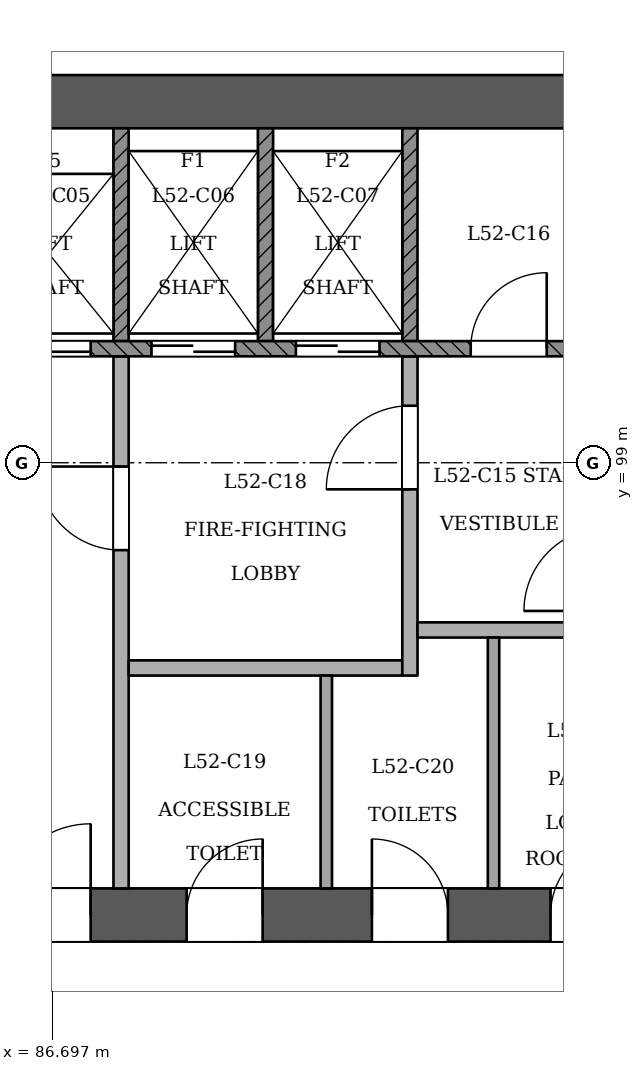
"""IFC4 building model, lengths in metres.
Left out: names, types, materials, properties, quantities, classifications, styles, units other than length and angle.
Written with IfcOpenShell. Run it as: python <this file> out.ifc"""

import sys

from ifc_helpers import new_model, si_unit, direction, frame, frame_2d, origin, place, context, subcontext, project, spatial, rectangle, extrude, element, fill, save


model = new_model("IFC4")
c1 = context("Model", 3, precision=1e-05, world=origin(), true_north=direction((0.0, 1.0)))
c2 = subcontext(c1, "Body", "Model", "MODEL_VIEW")
j1 = project(units=[si_unit("LENGTHUNIT", "METRE"), si_unit("PLANEANGLEUNIT", "RADIAN")], contexts=[c1])
p1 = place(None, origin())
s1 = spatial("IfcSite", under=j1, at=p1, CompositionType="ELEMENT")
p2 = place(p1, origin())
s2 = spatial("IfcBuilding", under=s1, at=p2, CompositionType="ELEMENT")
p3 = place(p2, frame((0.0, 0.0, 201.6)))
s3 = spatial("IfcBuildingStorey", under=s2, at=p3, CompositionType="ELEMENT", Elevation=201.6)
p4 = place(p3, frame((72.65, 93.05, 0.0), z_axis=(0.0, 0.0, 1.0), x_axis=(1.0, 0.0, 0.0)))
e1 = element("IfcWall", 1, at=p4, inside=s3, PredefinedType="SHEAR", context=c2, shape_type="SweptSolid", body=[
    extrude(rectangle(XDim=25.05, YDim=0.7, at=frame_2d((12.525, 0.0))), origin(), (0.0, 0.0, 1.0), 3.6),
])
p5 = place(p4, frame((1.15, 0.0, 0.0)))
e2 = element("IfcOpeningElement", 2, at=p5, cuts=e1, PredefinedType="OPENING", context=c2, shape_type="SweptSolid", body=[
    extrude(rectangle(XDim=1.2, YDim=2.1, at=frame_2d((0.6, 1.05))), frame((0.0, 0.36, 0.0), z_axis=(0.0, -1.0, 0.0), x_axis=(1.0, 0.0, 0.0)), (0.0, 0.0, 1.0), 0.721),
])
p6 = place(p4, frame((3.35, 0.0, 0.0)))
e3 = element("IfcOpeningElement", 3, at=p6, cuts=e1, PredefinedType="OPENING", context=c2, shape_type="SweptSolid", body=[
    extrude(rectangle(XDim=1.2, YDim=2.1, at=frame_2d((0.6, 1.05))), frame((0.0, 0.36, 0.0), z_axis=(0.0, -1.0, 0.0), x_axis=(1.0, 0.0, 0.0)), (0.0, 0.0, 1.0), 0.721),
])
p7 = place(p4, frame((13.35, 0.0, 0.0)))
e4 = element("IfcOpeningElement", 4, at=p7, cuts=e1, PredefinedType="OPENING", context=c2, shape_type="SweptSolid", body=[
    extrude(rectangle(XDim=1.2, YDim=2.1, at=frame_2d((0.6, 1.05))), frame((0.0, 0.36, 0.0), z_axis=(0.0, -1.0, 0.0), x_axis=(1.0, 0.0, 0.0)), (0.0, 0.0, 1.0), 0.721),
])
p8 = place(p4, frame((15.812, 0.0, 0.0)))
e5 = element("IfcOpeningElement", 5, at=p8, cuts=e1, PredefinedType="OPENING", context=c2, shape_type="SweptSolid", body=[
    extrude(rectangle(XDim=1.0, YDim=2.1, at=frame_2d((0.5, 1.05))), frame((0.0, 0.36, 0.0), z_axis=(0.0, -1.0, 0.0), x_axis=(1.0, 0.0, 0.0)), (0.0, 0.0, 1.0), 0.721),
])
p9 = place(p4, frame((18.25, 0.0, 0.0)))
e6 = element("IfcOpeningElement", 6, at=p9, cuts=e1, PredefinedType="OPENING", context=c2, shape_type="SweptSolid", body=[
    extrude(rectangle(XDim=1.0, YDim=2.1, at=frame_2d((0.5, 1.05))), frame((0.0, 0.36, 0.0), z_axis=(0.0, -1.0, 0.0), x_axis=(1.0, 0.0, 0.0)), (0.0, 0.0, 1.0), 0.721),
])
p10 = place(p4, frame((20.6, 0.0, 0.0)))
e7 = element("IfcOpeningElement", 7, at=p10, cuts=e1, PredefinedType="OPENING", context=c2, shape_type="SweptSolid", body=[
    extrude(rectangle(XDim=1.0, YDim=2.1, at=frame_2d((0.5, 1.05))), frame((0.0, 0.36, 0.0), z_axis=(0.0, -1.0, 0.0), x_axis=(1.0, 0.0, 0.0)), (0.0, 0.0, 1.0), 0.721),
])
p11 = place(p4, frame((22.887, 0.0, 0.0)))
e8 = element("IfcOpeningElement", 8, at=p11, cuts=e1, PredefinedType="OPENING", context=c2, shape_type="SweptSolid", body=[
    extrude(rectangle(XDim=1.0, YDim=2.1, at=frame_2d((0.5, 1.05))), frame((0.0, 0.36, 0.0), z_axis=(0.0, -1.0, 0.0), x_axis=(1.0, 0.0, 0.0)), (0.0, 0.0, 1.0), 0.721),
])
p12 = place(p3, frame((97.35, 103.75, 0.0), z_axis=(0.0, 0.0, 1.0), x_axis=(-1.0, 0.0, 0.0)))
e9 = element("IfcWall", 9, at=p12, inside=s3, PredefinedType="SHEAR", context=c2, shape_type="SweptSolid", body=[
    extrude(rectangle(XDim=25.05, YDim=0.7, at=frame_2d((12.525, 0.0))), origin(), (0.0, 0.0, 1.0), 3.6),
])
p13 = place(p3, frame((87.6, 93.4, 0.0), z_axis=(0.0, 0.0, 1.0), x_axis=(0.0, 1.0, 0.0)))
e10 = element("IfcWall", 10, at=p13, inside=s3, PredefinedType="PARTITIONING", context=c2, shape_type="SweptSolid", body=[
    extrude(rectangle(XDim=7.0, YDim=0.2, at=frame_2d((3.5, 0.0))), origin(), (0.0, 0.0, 1.0), 3.15),
])
p14 = place(p13, frame((4.45, 0.0, 0.0)))
e11 = element("IfcOpeningElement", 11, at=p14, cuts=e10, PredefinedType="OPENING", context=c2, shape_type="SweptSolid", body=[
    extrude(rectangle(XDim=1.1, YDim=2.1, at=frame_2d((0.55, 1.05))), frame((0.0, 0.11, 0.0), z_axis=(0.0, -1.0, 0.0), x_axis=(1.0, 0.0, 0.0)), (0.0, 0.0, 1.0), 0.221),
])
p15 = place(p3, frame((90.3, 93.4, 0.0), z_axis=(0.0, 0.0, 1.0), x_axis=(0.0, 1.0, 0.0)))
e12 = element("IfcWall", 12, at=p15, inside=s3, PredefinedType="PARTITIONING", context=c2, shape_type="SweptSolid", body=[
    extrude(rectangle(XDim=2.8, YDim=0.15, at=frame_2d((1.4, 0.0))), origin(), (0.0, 0.0, 1.0), 3.15),
])
p16 = place(p3, frame((92.5, 93.4, 0.0), z_axis=(0.0, 0.0, 1.0), x_axis=(0.0, 1.0, 0.0)))
e13 = element("IfcWall", 13, at=p16, inside=s3, PredefinedType="PARTITIONING", context=c2, shape_type="SweptSolid", body=[
    extrude(rectangle(XDim=3.3, YDim=0.15, at=frame_2d((1.65, 0.0))), origin(), (0.0, 0.0, 1.0), 3.15),
])
p17 = place(p3, frame((87.7, 96.3, 0.0), z_axis=(0.0, 0.0, 1.0), x_axis=(1.0, 0.0, 0.0)))
e14 = element("IfcWall", 14, at=p17, inside=s3, PredefinedType="PARTITIONING", context=c2, shape_type="SweptSolid", body=[
    extrude(rectangle(XDim=3.6, YDim=0.2, at=frame_2d((1.8, 0.0))), origin(), (0.0, 0.0, 1.0), 3.15),
])
p18 = place(p3, frame((91.4, 96.2, 0.0), z_axis=(0.0, 0.0, 1.0), x_axis=(0.0, 1.0, 0.0)))
e15 = element("IfcWall", 15, at=p18, inside=s3, PredefinedType="PARTITIONING", context=c2, shape_type="SweptSolid", body=[
    extrude(rectangle(XDim=4.2, YDim=0.2, at=frame_2d((2.1, 0.0))), origin(), (0.0, 0.0, 1.0), 3.15),
])
p19 = place(p18, frame((2.45, 0.0, 0.0)))
e16 = element("IfcOpeningElement", 16, at=p19, cuts=e15, PredefinedType="OPENING", context=c2, shape_type="SweptSolid", body=[
    extrude(rectangle(XDim=1.1, YDim=2.1, at=frame_2d((0.55, 1.05))), frame((0.0, 0.11, 0.0), z_axis=(0.0, -1.0, 0.0), x_axis=(1.0, 0.0, 0.0)), (0.0, 0.0, 1.0), 0.221),
])
p20 = place(p3, frame((91.5, 96.8, 0.0), z_axis=(0.0, 0.0, 1.0), x_axis=(1.0, 0.0, 0.0)))
e17 = element("IfcWall", 17, at=p20, inside=s3, PredefinedType="PARTITIONING", context=c2, shape_type="SweptSolid", body=[
    extrude(rectangle(XDim=2.4, YDim=0.2, at=frame_2d((1.2, 0.0))), origin(), (0.0, 0.0, 1.0), 3.15),
])
p21 = place(p3, frame((75.9, 100.5, 0.0), z_axis=(0.0, 0.0, 1.0), x_axis=(1.0, 0.0, 0.0)))
e18 = element("IfcWall", 18, at=p21, inside=s3, PredefinedType="SOLIDWALL", context=c2, shape_type="SweptSolid", body=[
    extrude(rectangle(XDim=18.2, YDim=0.2, at=frame_2d((9.1, 0.0))), origin(), (0.0, 0.0, 1.0), 3.15),
])
p22 = place(p21, frame((2.6, 0.0, 0.0)))
e19 = element("IfcOpeningElement", 19, at=p22, cuts=e18, PredefinedType="OPENING", context=c2, shape_type="SweptSolid", body=[
    extrude(rectangle(XDim=1.1, YDim=2.1, at=frame_2d((0.55, 1.05))), frame((0.0, 0.11, 0.0), z_axis=(0.0, -1.0, 0.0), x_axis=(1.0, 0.0, 0.0)), (0.0, 0.0, 1.0), 0.221),
])
p23 = place(p21, frame((4.5, 0.0, 0.0)))
e20 = element("IfcOpeningElement", 20, at=p23, cuts=e18, PredefinedType="OPENING", context=c2, shape_type="SweptSolid", body=[
    extrude(rectangle(XDim=1.1, YDim=2.1, at=frame_2d((0.55, 1.05))), frame((0.0, 0.11, 0.0), z_axis=(0.0, -1.0, 0.0), x_axis=(1.0, 0.0, 0.0)), (0.0, 0.0, 1.0), 0.221),
])
p24 = place(p21, frame((6.4, 0.0, 0.0)))
e21 = element("IfcOpeningElement", 21, at=p24, cuts=e18, PredefinedType="OPENING", context=c2, shape_type="SweptSolid", body=[
    extrude(rectangle(XDim=1.1, YDim=2.1, at=frame_2d((0.55, 1.05))), frame((0.0, 0.11, 0.0), z_axis=(0.0, -1.0, 0.0), x_axis=(1.0, 0.0, 0.0)), (0.0, 0.0, 1.0), 0.221),
])
p25 = place(p21, frame((8.3, 0.0, 0.0)))
e22 = element("IfcOpeningElement", 22, at=p25, cuts=e18, PredefinedType="OPENING", context=c2, shape_type="SweptSolid", body=[
    extrude(rectangle(XDim=1.1, YDim=2.1, at=frame_2d((0.55, 1.05))), frame((0.0, 0.11, 0.0), z_axis=(0.0, -1.0, 0.0), x_axis=(1.0, 0.0, 0.0)), (0.0, 0.0, 1.0), 0.221),
])
p26 = place(p21, frame((10.2, 0.0, 0.0)))
e23 = element("IfcOpeningElement", 23, at=p26, cuts=e18, PredefinedType="OPENING", context=c2, shape_type="SweptSolid", body=[
    extrude(rectangle(XDim=1.1, YDim=2.1, at=frame_2d((0.55, 1.05))), frame((0.0, 0.11, 0.0), z_axis=(0.0, -1.0, 0.0), x_axis=(1.0, 0.0, 0.0)), (0.0, 0.0, 1.0), 0.221),
])
p27 = place(p21, frame((12.1, 0.0, 0.0)))
e24 = element("IfcOpeningElement", 24, at=p27, cuts=e18, PredefinedType="OPENING", context=c2, shape_type="SweptSolid", body=[
    extrude(rectangle(XDim=1.1, YDim=2.1, at=frame_2d((0.55, 1.05))), frame((0.0, 0.11, 0.0), z_axis=(0.0, -1.0, 0.0), x_axis=(1.0, 0.0, 0.0)), (0.0, 0.0, 1.0), 0.221),
])
p28 = place(p21, frame((14.0, 0.0, 0.0)))
e25 = element("IfcOpeningElement", 25, at=p28, cuts=e18, PredefinedType="OPENING", context=c2, shape_type="SweptSolid", body=[
    extrude(rectangle(XDim=1.1, YDim=2.1, at=frame_2d((0.55, 1.05))), frame((0.0, 0.11, 0.0), z_axis=(0.0, -1.0, 0.0), x_axis=(1.0, 0.0, 0.0)), (0.0, 0.0, 1.0), 0.221),
])
p29 = place(p21, frame((0.65, 0.0, 0.0)))
e26 = element("IfcOpeningElement", 26, at=p29, cuts=e18, PredefinedType="OPENING", context=c2, shape_type="SweptSolid", body=[
    extrude(rectangle(XDim=1.0, YDim=2.1, at=frame_2d((0.5, 1.05))), frame((0.0, 0.11, 0.0), z_axis=(0.0, -1.0, 0.0), x_axis=(1.0, 0.0, 0.0)), (0.0, 0.0, 1.0), 0.221),
])
p30 = place(p21, frame((16.3, 0.0, 0.0)))
e27 = element("IfcOpeningElement", 27, at=p30, cuts=e18, PredefinedType="OPENING", context=c2, shape_type="SweptSolid", body=[
    extrude(rectangle(XDim=1.0, YDim=2.1, at=frame_2d((0.5, 1.05))), frame((0.0, 0.11, 0.0), z_axis=(0.0, -1.0, 0.0), x_axis=(1.0, 0.0, 0.0)), (0.0, 0.0, 1.0), 0.221),
])
for number, where, z_axis, x_axis in (
    (28, (87.6, 100.6, 0.0), (0.0, 0.0, 1.0), (0.0, 1.0, 0.0)),
    (29, (89.5, 100.6, 0.0), (0.0, 0.0, 1.0), (0.0, 1.0, 0.0)),
    (30, (91.4, 100.6, 0.0), (0.0, 0.0, 1.0), (0.0, 1.0, 0.0)),
):
    element("IfcWall", number, at=place(p3, frame(where, z_axis=z_axis, x_axis=x_axis)), inside=s3, PredefinedType="SOLIDWALL", context=c2, shape_type="SweptSolid", body=[
        extrude(rectangle(XDim=2.8, YDim=0.2, at=frame_2d((1.4, 0.0))), origin(), (0.0, 0.0, 1.0), 3.15),
    ])
p31 = place(p26, origin())
e31 = element("IfcDoor", 31, at=p31, inside=s3, OperationType="SLIDING_TO_RIGHT", PredefinedType="NOTDEFINED", context=c2, shape_type="SweptSolid", body=[
    extrude(rectangle(XDim=1.1, YDim=2.1, at=frame_2d((0.55, 1.05))), frame((0.0, 0.025, 0.0), z_axis=(0.0, -1.0, 0.0), x_axis=(1.0, 0.0, 0.0)), (0.0, 0.0, 1.0), 0.05),
])
fill(e23, e31)
p32 = place(p27, origin())
e32 = element("IfcDoor", 32, at=p32, inside=s3, OperationType="SLIDING_TO_RIGHT", PredefinedType="NOTDEFINED", context=c2, shape_type="SweptSolid", body=[
    extrude(rectangle(XDim=1.1, YDim=2.1, at=frame_2d((0.55, 1.05))), frame((0.0, 0.025, 0.0), z_axis=(0.0, -1.0, 0.0), x_axis=(1.0, 0.0, 0.0)), (0.0, 0.0, 1.0), 0.05),
])
fill(e24, e32)
p33 = place(p28, origin())
e33 = element("IfcDoor", 33, at=p33, inside=s3, OperationType="SLIDING_TO_LEFT", PredefinedType="NOTDEFINED", context=c2, shape_type="SweptSolid", body=[
    extrude(rectangle(XDim=1.1, YDim=2.1, at=frame_2d((0.55, 1.05))), frame((0.0, 0.025, 0.0), z_axis=(0.0, -1.0, 0.0), x_axis=(1.0, 0.0, 0.0)), (0.0, 0.0, 1.0), 0.05),
])
fill(e25, e33)
p34 = place(p14, origin())
e34 = element("IfcDoor", 34, at=p34, inside=s3, OperationType="SINGLE_SWING_RIGHT", PredefinedType="NOTDEFINED", context=c2, shape_type="SweptSolid", body=[
    extrude(rectangle(XDim=1.1, YDim=2.1, at=frame_2d((0.55, 1.05))), frame((0.0, 0.025, 0.0), z_axis=(0.0, -1.0, 0.0), x_axis=(1.0, 0.0, 0.0)), (0.0, 0.0, 1.0), 0.05),
])
fill(e11, e34)
p35 = place(p19, origin())
e35 = element("IfcDoor", 35, at=p35, inside=s3, OperationType="SINGLE_SWING_LEFT", PredefinedType="NOTDEFINED", context=c2, shape_type="SweptSolid", body=[
    extrude(rectangle(XDim=1.1, YDim=2.1, at=frame_2d((0.55, 1.05))), frame((0.0, 0.025, 0.0), z_axis=(0.0, -1.0, 0.0), x_axis=(1.0, 0.0, 0.0)), (0.0, 0.0, 1.0), 0.05),
])
fill(e16, e35)
p36 = place(p7, origin())
e36 = element("IfcDoor", 36, at=p36, inside=s3, OperationType="SINGLE_SWING_RIGHT", PredefinedType="NOTDEFINED", context=c2, shape_type="SweptSolid", body=[
    extrude(rectangle(XDim=1.2, YDim=2.1, at=frame_2d((0.6, 1.05))), frame((0.0, 0.025, 0.0), z_axis=(0.0, -1.0, 0.0), x_axis=(1.0, 0.0, 0.0)), (0.0, 0.0, 1.0), 0.05),
])
fill(e4, e36)
p37 = place(p30, origin())
e37 = element("IfcDoor", 37, at=p37, inside=s3, OperationType="SINGLE_SWING_RIGHT", PredefinedType="NOTDEFINED", context=c2, shape_type="SweptSolid", body=[
    extrude(rectangle(XDim=1.0, YDim=2.1, at=frame_2d((0.5, 1.05))), frame((0.0, 0.025, 0.0), z_axis=(0.0, -1.0, 0.0), x_axis=(1.0, 0.0, 0.0)), (0.0, 0.0, 1.0), 0.05),
])
fill(e27, e37)
p38 = place(p8, origin())
e38 = element("IfcDoor", 38, at=p38, inside=s3, OperationType="SINGLE_SWING_RIGHT", PredefinedType="NOTDEFINED", context=c2, shape_type="SweptSolid", body=[
    extrude(rectangle(XDim=1.0, YDim=2.1, at=frame_2d((0.5, 1.05))), frame((0.0, 0.025, 0.0), z_axis=(0.0, -1.0, 0.0), x_axis=(1.0, 0.0, 0.0)), (0.0, 0.0, 1.0), 0.05),
])
fill(e5, e38)
p39 = place(p9, origin())
e39 = element("IfcDoor", 39, at=p39, inside=s3, OperationType="SINGLE_SWING_LEFT", PredefinedType="NOTDEFINED", context=c2, shape_type="SweptSolid", body=[
    extrude(rectangle(XDim=1.0, YDim=2.1, at=frame_2d((0.5, 1.05))), frame((0.0, 0.025, 0.0), z_axis=(0.0, -1.0, 0.0), x_axis=(1.0, 0.0, 0.0)), (0.0, 0.0, 1.0), 0.05),
])
fill(e6, e39)
p40 = place(p10, origin())
e40 = element("IfcDoor", 40, at=p40, inside=s3, OperationType="SINGLE_SWING_RIGHT", PredefinedType="NOTDEFINED", context=c2, shape_type="SweptSolid", body=[
    extrude(rectangle(XDim=1.0, YDim=2.1, at=frame_2d((0.5, 1.05))), frame((0.0, 0.025, 0.0), z_axis=(0.0, -1.0, 0.0), x_axis=(1.0, 0.0, 0.0)), (0.0, 0.0, 1.0), 0.05),
])
fill(e7, e40)
save(model, sys.argv[1])
